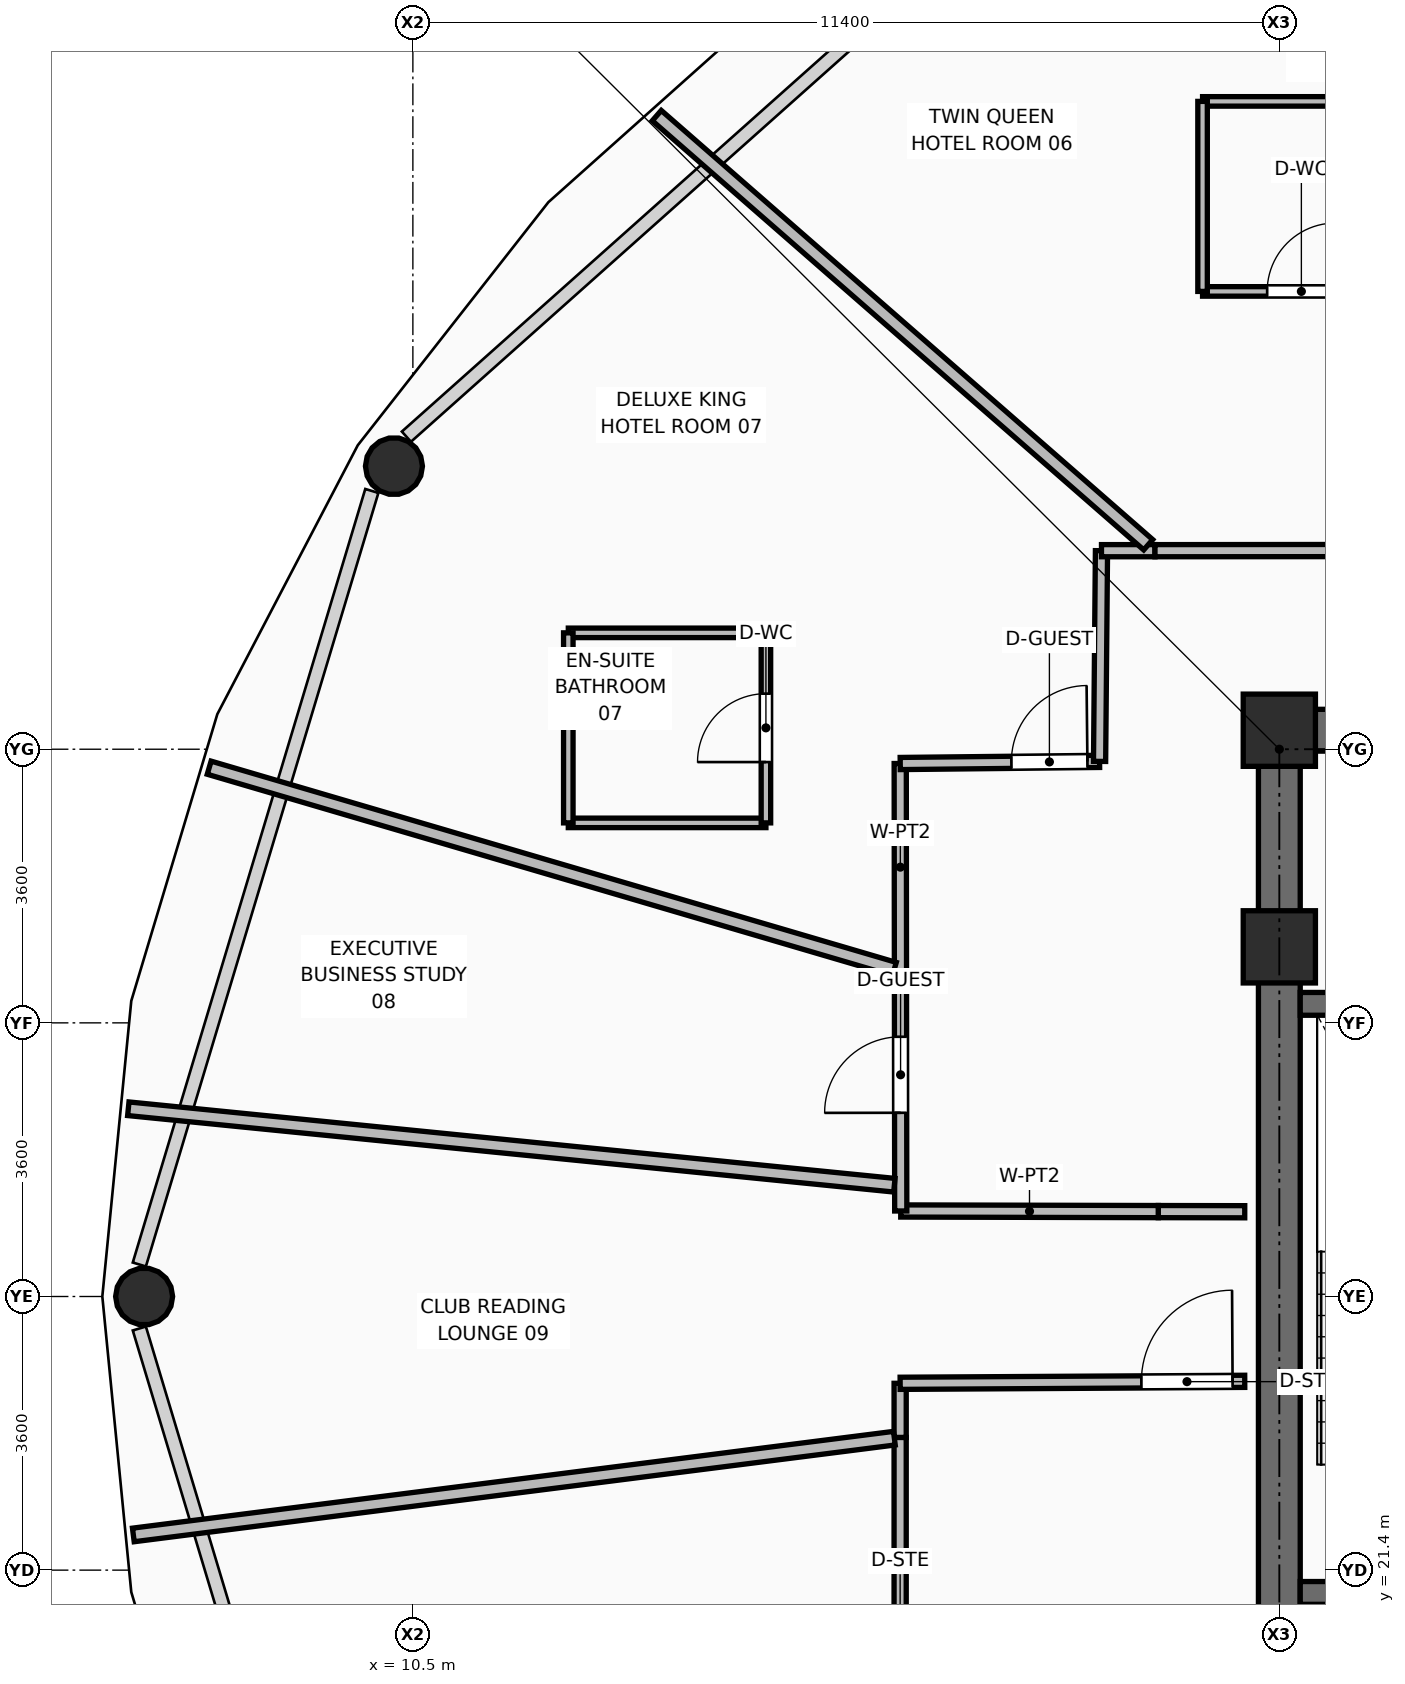
"""IFC4 building model, lengths in metres.
Left out: names, types, materials, properties, quantities, classifications, styles, units other than length and angle.
Written with IfcOpenShell. Run it as: python <this file> out.ifc"""

import sys

from ifc_helpers import new_model, si_unit, direction, frame, frame_2d, origin, origin_2d, place, context, subcontext, project, spatial, rectangle, hollow_circle, extrude, element, fill, save


model = new_model("IFC4")
c1 = context("Model", 3, precision=1e-05, world=origin(), true_north=direction((0.0, 1.0)))
c2 = subcontext(c1, "Body", "Model", "MODEL_VIEW")
j1 = project(units=[si_unit("LENGTHUNIT", "METRE"), si_unit("PLANEANGLEUNIT", "RADIAN")], contexts=[c1])
p1 = place(None, origin())
s1 = spatial("IfcSite", under=j1, at=p1, CompositionType="ELEMENT")
p2 = place(p1, origin())
s2 = spatial("IfcBuilding", under=s1, at=p2, CompositionType="ELEMENT")
p3 = place(p2, frame((0.0, 0.0, 172.2)))
s3 = spatial("IfcBuildingStorey", under=s2, at=p3, CompositionType="ELEMENT", Elevation=172.2)
for number, where, z_axis, x_axis in (
    (1, (21.9, 29.6, 0.0), (0.0, 0.0, 1.0), (1.0, 0.0, 0.0)),
    (2, (21.9, 32.45, 0.0), (0.0, 0.0, 1.0), (1.0, 0.0, 0.0)),
):
    element("IfcColumn", number, at=place(p3, frame(where, z_axis=z_axis, x_axis=x_axis)), inside=s3, PredefinedType="COLUMN", context=c2, shape_type="SweptSolid", body=[
        extrude(rectangle(XDim=0.95, YDim=0.95, at=origin_2d()), origin(), (0.0, 0.0, 1.0), 3.75),
    ])
p4 = place(p3, frame((10.251, 35.924, 0.0), z_axis=(0.045976334235, -0.023684778242, 0.998661708473), x_axis=(0.457956589674, 0.888974556427, 0.0)))
e3 = element("IfcColumn", 3, at=p4, inside=s3, PredefinedType="COLUMN", context=c2, shape_type="SweptSolid", body=[
    extrude(hollow_circle(Radius=0.375, WallThickness=0.035, at=origin_2d()), origin(), (0.0, 0.0, 1.0), 3.505),
])
p5 = place(p3, frame((6.964, 25.0, 0.0), z_axis=(0.053008515617, 0.0, 0.998594060303), x_axis=(0.0, 1.0, 0.0)))
e4 = element("IfcColumn", 4, at=p5, inside=s3, PredefinedType="COLUMN", context=c2, shape_type="SweptSolid", body=[
    extrude(hollow_circle(Radius=0.375, WallThickness=0.035, at=origin_2d()), origin(), (0.0, 0.0, 1.0), 3.505),
])
p6 = place(p3, frame((21.625, 32.45, 0.0), z_axis=(0.0, 0.0, 1.0), x_axis=(1.0, 0.0, 0.0)))
e5 = element("IfcWall", 5, at=p6, inside=s3, PredefinedType="SHEAR", context=c2, shape_type="SweptSolid", body=[
    extrude(rectangle(XDim=19.75, YDim=0.55, at=frame_2d((9.875, 0.0))), origin(), (0.0, 0.0, 1.0), 3.5),
])
p7 = place(p6, frame((2.125, 0.0, 0.0)))
e6 = element("IfcOpeningElement", 6, at=p7, cuts=e5, PredefinedType="OPENING", context=c2, shape_type="SweptSolid", body=[
    extrude(rectangle(XDim=1.1, YDim=2.1, at=frame_2d((0.55, 1.05))), frame((0.0, 0.285, 0.0), z_axis=(0.0, -1.0, 0.0), x_axis=(1.0, 0.0, 0.0)), (0.0, 0.0, 1.0), 0.57),
])
p8 = place(p6, frame((15.515, 0.0, 0.0)))
e7 = element("IfcOpeningElement", 7, at=p8, cuts=e5, PredefinedType="OPENING", context=c2, shape_type="SweptSolid", body=[
    extrude(rectangle(XDim=1.0, YDim=2.1, at=frame_2d((0.5, 1.05))), frame((0.0, 0.285, 0.0), z_axis=(0.0, -1.0, 0.0), x_axis=(1.0, 0.0, 0.0)), (0.0, 0.0, 1.0), 0.57),
])
p9 = place(p6, frame((17.525, 0.0, 0.0)))
e8 = element("IfcOpeningElement", 8, at=p9, cuts=e5, PredefinedType="OPENING", context=c2, shape_type="SweptSolid", body=[
    extrude(rectangle(XDim=0.9, YDim=2.1, at=frame_2d((0.45, 1.05))), frame((0.0, 0.285, 0.0), z_axis=(0.0, -1.0, 0.0), x_axis=(1.0, 0.0, 0.0)), (0.0, 0.0, 1.0), 0.57),
])
p10 = place(p3, frame((21.9, 18.075, 0.0), z_axis=(0.0, 0.0, 1.0), x_axis=(0.0, 1.0, 0.0)))
e9 = element("IfcWall", 9, at=p10, inside=s3, PredefinedType="SHEAR", context=c2, shape_type="SweptSolid", body=[
    extrude(rectangle(XDim=14.1, YDim=0.55, at=frame_2d((7.05, 0.0))), origin(), (0.0, 0.0, 1.0), 3.5),
])
p11 = place(p3, frame((22.175, 21.1, 0.0), z_axis=(0.0, 0.0, 1.0), x_axis=(1.0, 0.0, 0.0)))
e10 = element("IfcWall", 10, at=p11, inside=s3, PredefinedType="SHEAR", context=c2, shape_type="SweptSolid", body=[
    extrude(rectangle(XDim=3.565, YDim=0.3, at=frame_2d((1.782, 0.0))), origin(), (0.0, 0.0, 1.0), 3.5),
])
p12 = place(p11, frame((2.045, 0.0, 0.0)))
e11 = element("IfcOpeningElement", 11, at=p12, cuts=e10, PredefinedType="OPENING", context=c2, shape_type="SweptSolid", body=[
    extrude(rectangle(XDim=1.05, YDim=2.1, at=frame_2d((0.525, 1.05))), frame((0.0, 0.16, 0.0), z_axis=(0.0, -1.0, 0.0), x_axis=(1.0, 0.0, 0.0)), (0.0, 0.0, 1.0), 0.32),
])
p13 = place(p3, frame((22.175, 28.85, 0.0), z_axis=(0.0, 0.0, 1.0), x_axis=(1.0, 0.0, 0.0)))
e12 = element("IfcWall", 12, at=p13, inside=s3, PredefinedType="SHEAR", context=c2, shape_type="SweptSolid", body=[
    extrude(rectangle(XDim=3.565, YDim=0.3, at=frame_2d((1.782, 0.0))), origin(), (0.0, 0.0, 1.0), 3.5),
])
p14 = place(p3, frame((21.445, 26.115, 0.0), z_axis=(0.0, 0.0, 1.0), x_axis=(-0.999998527672, 0.001715999189, 0.0)))
e13 = element("IfcWall", 13, at=p14, inside=s3, PredefinedType="PARTITIONING", context=c2, shape_type="SweptSolid", body=[
    extrude(rectangle(XDim=1.138, YDim=0.16, at=frame_2d((0.569, 0.0))), origin(), (0.0, 0.0, 1.0), 2.525),
])
p15 = place(p3, frame((20.307, 26.117, 0.0), z_axis=(0.0, 0.0, 1.0), x_axis=(-0.999997172485, 0.002378028875, 0.0)))
e14 = element("IfcWall", 14, at=p15, inside=s3, PredefinedType="PARTITIONING", context=c2, shape_type="SweptSolid", body=[
    extrude(rectangle(XDim=3.388, YDim=0.16, at=frame_2d((1.694, 0.0))), origin(), (0.0, 0.0, 1.0), 3.48),
])
p16 = place(p3, frame((16.919, 26.125, 0.0), z_axis=(0.0, 0.0, 1.0), x_axis=(-0.001236188501, 0.999999235919, 0.0)))
e15 = element("IfcWall", 15, at=p16, inside=s3, PredefinedType="PARTITIONING", context=c2, shape_type="SweptSolid", body=[
    extrude(rectangle(XDim=3.16, YDim=0.16, at=frame_2d((1.58, 0.0))), origin(), (0.0, 0.0, 1.0), 3.48),
])
p17 = place(p16, frame((1.292, 0.0, 0.0)))
e16 = element("IfcOpeningElement", 16, at=p17, cuts=e15, PredefinedType="OPENING", context=c2, shape_type="SweptSolid", body=[
    extrude(rectangle(XDim=1.0, YDim=2.1, at=frame_2d((0.5, 1.05))), frame((0.0, 0.09, 0.0), z_axis=(0.0, -1.0, 0.0), x_axis=(1.0, 0.0, 0.0)), (0.0, 0.0, 1.0), 0.18),
])
p18 = place(p3, frame((16.915, 29.285, 0.0), z_axis=(0.0, 0.0, 1.0), x_axis=(-0.001074305557, 0.999999422934, 0.0)))
e17 = element("IfcWall", 17, at=p18, inside=s3, PredefinedType="PARTITIONING", context=c2, shape_type="SweptSolid", body=[
    extrude(rectangle(XDim=2.727, YDim=0.16, at=frame_2d((1.364, 0.0))), origin(), (0.0, 0.0, 1.0), 3.48),
])
p19 = place(p3, frame((16.912, 32.012, 0.0), z_axis=(0.0, 0.0, 1.0), x_axis=(0.999942710212, 0.010704031618, 0.0)))
e18 = element("IfcWall", 18, at=p19, inside=s3, PredefinedType="PARTITIONING", context=c2, shape_type="SweptSolid", body=[
    extrude(rectangle(XDim=2.623, YDim=0.16, at=frame_2d((1.312, 0.0))), origin(), (0.0, 0.0, 1.0), 3.48),
])
p20 = place(p19, frame((1.463, 0.0, 0.0)))
e19 = element("IfcOpeningElement", 19, at=p20, cuts=e18, PredefinedType="OPENING", context=c2, shape_type="SweptSolid", body=[
    extrude(rectangle(XDim=1.0, YDim=2.1, at=frame_2d((0.5, 1.05))), frame((0.0, 0.09, 0.0), z_axis=(0.0, -1.0, 0.0), x_axis=(1.0, 0.0, 0.0)), (0.0, 0.0, 1.0), 0.18),
])
p21 = place(p3, frame((19.535, 32.04, 0.0), z_axis=(0.0, 0.0, 1.0), x_axis=(0.009071319538, 0.999958854734, 0.0)))
e20 = element("IfcWall", 20, at=p21, inside=s3, PredefinedType="PARTITIONING", context=c2, shape_type="SweptSolid", body=[
    extrude(rectangle(XDim=2.772, YDim=0.16, at=frame_2d((1.386, 0.0))), origin(), (0.0, 0.0, 1.0), 2.936),
])
p22 = place(p3, frame((19.56, 34.812, 0.0), z_axis=(0.0, 0.0, 1.0), x_axis=(1.0, 0.0, 0.0)))
e21 = element("IfcWall", 21, at=p22, inside=s3, PredefinedType="PARTITIONING", context=c2, shape_type="SweptSolid", body=[
    extrude(rectangle(XDim=0.704, YDim=0.16, at=frame_2d((0.352, 0.0))), origin(), (0.0, 0.0, 1.0), 3.48),
])
p23 = place(p3, frame((20.264, 34.812, 0.0), z_axis=(0.0, 0.0, 1.0), x_axis=(0.999999756257, 0.000698201959, 0.0)))
e22 = element("IfcWall", 22, at=p23, inside=s3, PredefinedType="PARTITIONING", context=c2, shape_type="SweptSolid", body=[
    extrude(rectangle(XDim=4.196, YDim=0.16, at=frame_2d((2.098, 0.0))), origin(), (0.0, 0.0, 1.0), 2.936),
])
p24 = place(p23, frame((3.036, 0.0, 0.0)))
e23 = element("IfcOpeningElement", 23, at=p24, cuts=e22, PredefinedType="OPENING", context=c2, shape_type="SweptSolid", body=[
    extrude(rectangle(XDim=1.0, YDim=2.1, at=frame_2d((0.5, 1.05))), frame((0.0, 0.09, 0.0), z_axis=(0.0, -1.0, 0.0), x_axis=(1.0, 0.0, 0.0)), (0.0, 0.0, 1.0), 0.18),
])
p25 = place(p3, frame((16.911, 17.992, 0.0), z_axis=(0.0, 0.0, 1.0), x_axis=(0.0, 1.0, 0.0)))
e24 = element("IfcWall", 24, at=p25, inside=s3, PredefinedType="PARTITIONING", context=c2, shape_type="SweptSolid", body=[
    extrude(rectangle(XDim=5.154, YDim=0.16, at=frame_2d((2.577, 0.0))), origin(), (0.0, 0.0, 1.0), 2.936),
])
p26 = place(p25, frame((1.323, 0.0, 0.0)))
e25 = element("IfcOpeningElement", 25, at=p26, cuts=e24, PredefinedType="OPENING", context=c2, shape_type="SweptSolid", body=[
    extrude(rectangle(XDim=1.2, YDim=2.1, at=frame_2d((0.6, 1.05))), frame((0.0, 0.09, 0.0), z_axis=(0.0, -1.0, 0.0), x_axis=(1.0, 0.0, 0.0)), (0.0, 0.0, 1.0), 0.18),
])
p27 = place(p3, frame((16.911, 23.146, 0.0), z_axis=(0.0, 0.0, 1.0), x_axis=(0.0, 1.0, 0.0)))
e26 = element("IfcWall", 26, at=p27, inside=s3, PredefinedType="PARTITIONING", context=c2, shape_type="SweptSolid", body=[
    extrude(rectangle(XDim=0.712, YDim=0.16, at=frame_2d((0.356, 0.0))), origin(), (0.0, 0.0, 1.0), 3.48),
])
p28 = place(p3, frame((16.911, 23.858, 0.0), z_axis=(0.0, 0.0, 1.0), x_axis=(0.999983403772, 0.005761265572, 0.0)))
e27 = element("IfcWall", 27, at=p28, inside=s3, PredefinedType="PARTITIONING", context=c2, shape_type="SweptSolid", body=[
    extrude(rectangle(XDim=4.534, YDim=0.16, at=frame_2d((2.267, 0.0))), origin(), (0.0, 0.0, 1.0), 2.525),
])
p29 = place(p28, frame((3.174, 0.0, 0.0)))
e28 = element("IfcOpeningElement", 28, at=p29, cuts=e27, PredefinedType="OPENING", context=c2, shape_type="SweptSolid", body=[
    extrude(rectangle(XDim=1.2, YDim=2.1, at=frame_2d((0.6, 1.05))), frame((0.0, 0.09, 0.0), z_axis=(0.0, -1.0, 0.0), x_axis=(1.0, 0.0, 0.0)), (0.0, 0.0, 1.0), 0.18),
])
p30 = place(p3, frame((20.175, 34.89, 0.0), z_axis=(0.0, 0.0, 1.0), x_axis=(-0.753258118622, 0.657725023646, 0.0)))
e29 = element("IfcWall", 29, at=p30, inside=s3, PredefinedType="PARTITIONING", context=c2, shape_type="SweptSolid", body=[
    extrude(rectangle(XDim=8.584, YDim=0.18, at=frame_2d((4.292, 0.0))), origin(), (0.0, 0.0, 1.0), 2.783),
])
p31 = place(p3, frame((16.835, 29.309, 0.0), z_axis=(0.0, 0.0, 1.0), x_axis=(-0.959465984562, 0.281824456833, 0.0)))
e30 = element("IfcWall", 30, at=p31, inside=s3, PredefinedType="PARTITIONING", context=c2, shape_type="SweptSolid", body=[
    extrude(rectangle(XDim=9.396, YDim=0.18, at=frame_2d((4.698, 0.0))), origin(), (0.0, 0.0, 1.0), 2.783),
])
p32 = place(p3, frame((16.835, 26.464, 0.0), z_axis=(0.0, 0.0, 1.0), x_axis=(-0.995056978166, 0.099305640337, 0.0)))
e31 = element("IfcWall", 31, at=p32, inside=s3, PredefinedType="PARTITIONING", context=c2, shape_type="SweptSolid", body=[
    extrude(rectangle(XDim=10.129, YDim=0.18, at=frame_2d((5.064, 0.0))), origin(), (0.0, 0.0, 1.0), 2.783),
])
p33 = place(p3, frame((16.835, 23.136, 0.0), z_axis=(0.0, 0.0, 1.0), x_axis=(-0.992015582563, -0.126115359703, 0.0)))
e32 = element("IfcWall", 32, at=p33, inside=s3, PredefinedType="PARTITIONING", context=c2, shape_type="SweptSolid", body=[
    extrude(rectangle(XDim=10.094, YDim=0.18, at=frame_2d((5.047, 0.0))), origin(), (0.0, 0.0, 1.0), 2.783),
])
p34 = place(p3, frame((20.89, 38.223, 0.0), z_axis=(0.0, 0.0, 1.0), x_axis=(1.0, 0.0, 0.0)))
e33 = element("IfcWall", 33, at=p34, inside=s3, PredefinedType="PARTITIONING", context=c2, shape_type="SweptSolid", body=[
    extrude(rectangle(XDim=2.6, YDim=0.125, at=frame_2d((1.3, 0.0))), origin(), (0.0, 0.0, 1.0), 3.48),
])
p35 = place(p34, frame((0.85, 0.0, 0.0)))
e34 = element("IfcOpeningElement", 34, at=p35, cuts=e33, PredefinedType="OPENING", context=c2, shape_type="SweptSolid", body=[
    extrude(rectangle(XDim=0.9, YDim=2.1, at=frame_2d((0.45, 1.05))), frame((0.0, 0.073, 0.0), z_axis=(0.0, -1.0, 0.0), x_axis=(1.0, 0.0, 0.0)), (0.0, 0.0, 1.0), 0.145),
])
p36 = place(p3, frame((20.89, 40.723, 0.0), z_axis=(0.0, 0.0, 1.0), x_axis=(1.0, 0.0, 0.0)))
e35 = element("IfcWall", 35, at=p36, inside=s3, PredefinedType="PARTITIONING", context=c2, shape_type="SweptSolid", body=[
    extrude(rectangle(XDim=2.6, YDim=0.125, at=frame_2d((1.3, 0.0))), origin(), (0.0, 0.0, 1.0), 3.48),
])
p37 = place(p3, frame((20.89, 38.223, 0.0), z_axis=(0.0, 0.0, 1.0), x_axis=(0.0, 1.0, 0.0)))
e36 = element("IfcWall", 36, at=p37, inside=s3, PredefinedType="PARTITIONING", context=c2, shape_type="SweptSolid", body=[
    extrude(rectangle(XDim=2.5, YDim=0.125, at=frame_2d((1.25, 0.0))), origin(), (0.0, 0.0, 1.0), 2.936),
])
for number, where, z_axis, x_axis in (
    (37, (12.545, 31.231, 0.0), (0.0, 0.0, 1.0), (1.0, 0.0, 0.0)),
    (38, (12.545, 33.731, 0.0), (0.0, 0.0, 1.0), (1.0, 0.0, 0.0)),
):
    element("IfcWall", number, at=place(p3, frame(where, z_axis=z_axis, x_axis=x_axis)), inside=s3, PredefinedType="PARTITIONING", context=c2, shape_type="SweptSolid", body=[
        extrude(rectangle(XDim=2.6, YDim=0.125, at=frame_2d((1.3, 0.0))), origin(), (0.0, 0.0, 1.0), 3.48),
    ])
p38 = place(p3, frame((12.545, 31.231, 0.0), z_axis=(0.0, 0.0, 1.0), x_axis=(0.0, 1.0, 0.0)))
e39 = element("IfcWall", 39, at=p38, inside=s3, PredefinedType="PARTITIONING", context=c2, shape_type="SweptSolid", body=[
    extrude(rectangle(XDim=2.5, YDim=0.125, at=frame_2d((1.25, 0.0))), origin(), (0.0, 0.0, 1.0), 3.48),
])
p39 = place(p3, frame((15.145, 31.231, 0.0), z_axis=(0.0, 0.0, 1.0), x_axis=(0.0, 1.0, 0.0)))
e40 = element("IfcWall", 40, at=p39, inside=s3, PredefinedType="PARTITIONING", context=c2, shape_type="SweptSolid", body=[
    extrude(rectangle(XDim=2.5, YDim=0.125, at=frame_2d((1.25, 0.0))), origin(), (0.0, 0.0, 1.0), 3.48),
])
p40 = place(p39, frame((0.8, 0.0, 0.0)))
e41 = element("IfcOpeningElement", 41, at=p40, cuts=e40, PredefinedType="OPENING", context=c2, shape_type="SweptSolid", body=[
    extrude(rectangle(XDim=0.9, YDim=2.1, at=frame_2d((0.45, 1.05))), frame((0.0, 0.073, 0.0), z_axis=(0.0, -1.0, 0.0), x_axis=(1.0, 0.0, 0.0)), (0.0, 0.0, 1.0), 0.145),
])
p41 = place(p35, origin())
e42 = element("IfcDoor", 42, at=p41, inside=s3, OperationType="SINGLE_SWING_RIGHT", PredefinedType="DOOR", context=c2, shape_type="SweptSolid", body=[
    extrude(rectangle(XDim=0.9, YDim=2.1, at=frame_2d((0.45, 1.05))), frame((0.0, 0.025, 0.0), z_axis=(0.0, -1.0, 0.0), x_axis=(1.0, 0.0, 0.0)), (0.0, 0.0, 1.0), 0.05),
])
fill(e34, e42)
p42 = place(p40, origin())
e43 = element("IfcDoor", 43, at=p42, inside=s3, OperationType="SINGLE_SWING_LEFT", PredefinedType="DOOR", context=c2, shape_type="SweptSolid", body=[
    extrude(rectangle(XDim=0.9, YDim=2.1, at=frame_2d((0.45, 1.05))), frame((0.0, 0.025, 0.0), z_axis=(0.0, -1.0, 0.0), x_axis=(1.0, 0.0, 0.0)), (0.0, 0.0, 1.0), 0.05),
])
fill(e41, e43)
p43 = place(p20, origin())
e44 = element("IfcDoor", 44, at=p43, inside=s3, OperationType="SINGLE_SWING_RIGHT", PredefinedType="DOOR", context=c2, shape_type="SweptSolid", body=[
    extrude(rectangle(XDim=1.0, YDim=2.1, at=frame_2d((0.5, 1.05))), frame((0.0, 0.025, 0.0), z_axis=(0.0, -1.0, 0.0), x_axis=(1.0, 0.0, 0.0)), (0.0, 0.0, 1.0), 0.05),
])
fill(e19, e44)
p44 = place(p17, origin())
e45 = element("IfcDoor", 45, at=p44, inside=s3, OperationType="SINGLE_SWING_LEFT", PredefinedType="DOOR", context=c2, shape_type="SweptSolid", body=[
    extrude(rectangle(XDim=1.0, YDim=2.1, at=frame_2d((0.5, 1.05))), frame((0.0, 0.025, 0.0), z_axis=(0.0, -1.0, 0.0), x_axis=(1.0, 0.0, 0.0)), (0.0, 0.0, 1.0), 0.05),
])
fill(e16, e45)
p45 = place(p29, origin())
e46 = element("IfcDoor", 46, at=p45, inside=s3, OperationType="SINGLE_SWING_RIGHT", PredefinedType="DOOR", context=c2, shape_type="SweptSolid", body=[
    extrude(rectangle(XDim=1.2, YDim=2.1, at=frame_2d((0.6, 1.05))), frame((0.0, 0.025, 0.0), z_axis=(0.0, -1.0, 0.0), x_axis=(1.0, 0.0, 0.0)), (0.0, 0.0, 1.0), 0.05),
])
fill(e28, e46)
save(model, sys.argv[1])
